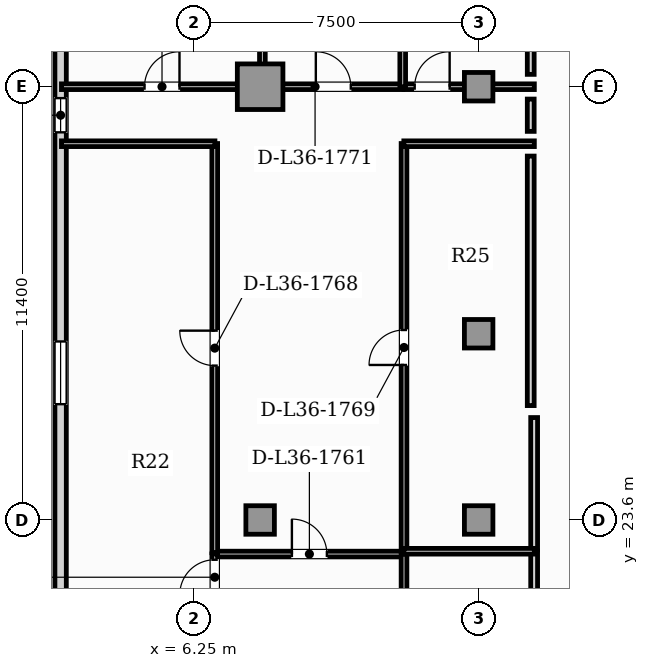
"""IFC4 building model, lengths in metres.
Left out: names, types, materials, properties, quantities, classifications, styles, units other than length and angle.
Written with IfcOpenShell. Run it as: python <this file> out.ifc"""

import sys

from ifc_helpers import new_model, si_unit, direction, frame, frame_2d, origin, origin_2d, place, context, subcontext, project, spatial, rectangle, hollow_rectangle, extrude, element, fill, save


model = new_model("IFC4")
c1 = context("Model", 3, precision=1e-05, world=origin(), true_north=direction((0.0, 1.0)))
c2 = subcontext(c1, "Body", "Model", "MODEL_VIEW")
j1 = project(units=[si_unit("LENGTHUNIT", "METRE"), si_unit("PLANEANGLEUNIT", "RADIAN")], contexts=[c1])
p1 = place(None, origin())
s1 = spatial("IfcSite", under=j1, at=p1, CompositionType="ELEMENT")
p2 = place(p1, origin())
s2 = spatial("IfcBuilding", under=s1, at=p2, CompositionType="ELEMENT")
p3 = place(p2, frame((0.0, 0.0, 149.05)))
s3 = spatial("IfcBuildingStorey", under=s2, at=p3, CompositionType="ELEMENT", Elevation=149.05)
p4 = place(p3, frame((8.0, 35.0, 0.0), z_axis=(0.0, 0.0, 1.0), x_axis=(1.0, 0.0, 0.0)))
e1 = element("IfcColumn", 1, at=p4, inside=s3, PredefinedType="USERDEFINED", context=c2, shape_type="SweptSolid", body=[
    extrude(hollow_rectangle(XDim=1.2, YDim=1.2, WallThickness=0.07, at=origin_2d()), origin(), (0.0, 0.0, 1.0), 3.85),
])
for number, where, z_axis, x_axis in (
    (2, (8.0, 23.6, 0.0), (0.0, 0.0, 1.0), (1.0, 0.0, 0.0)),
    (3, (13.75, 23.6, 0.0), (0.0, 0.0, 1.0), (1.0, 0.0, 0.0)),
    (4, (13.75, 28.5, 0.0), (0.0, 0.0, 1.0), (1.0, 0.0, 0.0)),
    (5, (13.75, 35.0, 0.0), (0.0, 0.0, 1.0), (1.0, 0.0, 0.0)),
):
    element("IfcColumn", number, at=place(p3, frame(where, z_axis=z_axis, x_axis=x_axis)), inside=s3, PredefinedType="COLUMN", context=c2, shape_type="SweptSolid", body=[
        extrude(rectangle(XDim=0.75, YDim=0.75, at=origin_2d()), origin(), (0.0, 0.0, 1.0), 3.85),
    ])
p5 = place(p3, frame((2.75, 39.96, 0.0), z_axis=(0.0, 0.0, 1.0), x_axis=(0.0, -1.0, 0.0)))
e6 = element("IfcWall", 6, at=p5, inside=s3, PredefinedType="SOLIDWALL", context=c2, shape_type="SweptSolid", body=[
    extrude(rectangle(XDim=36.72, YDim=0.3, at=frame_2d((18.36, 0.0))), origin(), (0.0, 0.0, 1.0), 3.63),
])
p6 = place(p5, frame((5.26, 0.0, 0.95)))
e7 = element("IfcOpeningElement", 7, at=p6, cuts=e6, PredefinedType="OPENING", context=c2, shape_type="SweptSolid", body=[
    extrude(rectangle(XDim=0.9, YDim=1.5, at=frame_2d((0.45, 0.75))), frame((0.0, 0.16, 0.0), z_axis=(0.0, -1.0, 0.0), x_axis=(1.0, 0.0, 0.0)), (0.0, 0.0, 1.0), 0.32),
])
p7 = place(p5, frame((19.283, 0.0, 0.88)))
e8 = element("IfcOpeningElement", 8, at=p7, cuts=e6, PredefinedType="OPENING", context=c2, shape_type="SweptSolid", body=[
    extrude(rectangle(XDim=1.65, YDim=2.0, at=frame_2d((0.825, 1.0))), frame((0.0, 0.16, 0.0), z_axis=(0.0, -1.0, 0.0), x_axis=(1.0, 0.0, 0.0)), (0.0, 0.0, 1.0), 0.32),
])
p8 = place(p5, frame((11.663, 0.0, 0.88)))
e9 = element("IfcOpeningElement", 9, at=p8, cuts=e6, PredefinedType="OPENING", context=c2, shape_type="SweptSolid", body=[
    extrude(rectangle(XDim=1.65, YDim=2.0, at=frame_2d((0.825, 1.0))), frame((0.0, 0.16, 0.0), z_axis=(0.0, -1.0, 0.0), x_axis=(1.0, 0.0, 0.0)), (0.0, 0.0, 1.0), 0.32),
])
p9 = place(p3, frame((15.21, 16.944, 0.0), z_axis=(0.0, 0.0, 1.0), x_axis=(0.0, 1.0, 0.0)))
e10 = element("IfcWall", 10, at=p9, inside=s3, PredefinedType="PARTITIONING", context=c2, shape_type="SweptSolid", body=[
    extrude(rectangle(XDim=5.838, YDim=0.18, at=frame_2d((2.919, 0.0))), origin(), (0.0, 0.0, 1.0), 3.63),
])
p10 = place(p3, frame((15.21, 22.812, 0.0), z_axis=(0.0, 0.0, 1.0), x_axis=(0.0, 1.0, 0.0)))
e11 = element("IfcWall", 11, at=p10, inside=s3, PredefinedType="PARTITIONING", context=c2, shape_type="SweptSolid", body=[
    extrude(rectangle(XDim=3.482, YDim=0.18, at=frame_2d((1.741, 0.0))), origin(), (0.0, 0.0, 1.0), 3.63),
])
p11 = place(p3, frame((6.801, 22.703, 0.0), z_axis=(0.0, 0.0, 1.0), x_axis=(1.0, 0.0, 0.0)))
e12 = element("IfcWall", 12, at=p11, inside=s3, PredefinedType="PARTITIONING", context=c2, shape_type="SweptSolid", body=[
    extrude(rectangle(XDim=4.99, YDim=0.15, at=frame_2d((2.495, 0.0))), origin(), (0.0, 0.0, 1.0), 3.63),
])
p12 = place(p11, frame((2.035, 0.0, 0.0)))
e13 = element("IfcOpeningElement", 13, at=p12, cuts=e12, PredefinedType="OPENING", context=c2, shape_type="SweptSolid", body=[
    extrude(rectangle(XDim=0.92, YDim=2.1, at=frame_2d((0.46, 1.05))), frame((0.0, 0.085, 0.0), z_axis=(0.0, -1.0, 0.0), x_axis=(1.0, 0.0, 0.0)), (0.0, 0.0, 1.0), 0.17),
])
p13 = place(p3, frame((6.806, 21.479, 0.0), z_axis=(0.0, 0.0, 1.0), x_axis=(0.0, 1.0, 0.0)))
e14 = element("IfcWall", 14, at=p13, inside=s3, PredefinedType="PARTITIONING", context=c2, shape_type="SweptSolid", body=[
    extrude(rectangle(XDim=1.229, YDim=0.15, at=frame_2d((0.615, 0.0))), origin(), (0.0, 0.0, 1.0), 3.63),
])
p14 = place(p13, frame((0.155, 0.0, 0.0)))
e15 = element("IfcOpeningElement", 15, at=p14, cuts=e14, PredefinedType="OPENING", context=c2, shape_type="SweptSolid", body=[
    extrude(rectangle(XDim=0.92, YDim=2.1, at=frame_2d((0.46, 1.05))), frame((0.0, 0.085, 0.0), z_axis=(0.0, -1.0, 0.0), x_axis=(1.0, 0.0, 0.0)), (0.0, 0.0, 1.0), 0.17),
])
p15 = place(p3, frame((11.786, 16.944, 0.0), z_axis=(0.0, 0.0, 1.0), x_axis=(0.0, 1.0, 0.0)))
e16 = element("IfcWall", 16, at=p15, inside=s3, PredefinedType="PARTITIONING", context=c2, shape_type="SweptSolid", body=[
    extrude(rectangle(XDim=5.764, YDim=0.15, at=frame_2d((2.882, 0.0))), origin(), (0.0, 0.0, 1.0), 3.63),
])
p16 = place(p15, frame((2.422, 0.0, 0.0)))
e17 = element("IfcOpeningElement", 17, at=p16, cuts=e16, PredefinedType="OPENING", context=c2, shape_type="SweptSolid", body=[
    extrude(rectangle(XDim=0.92, YDim=2.1, at=frame_2d((0.46, 1.05))), frame((0.0, 0.085, 0.0), z_axis=(0.0, -1.0, 0.0), x_axis=(1.0, 0.0, 0.0)), (0.0, 0.0, 1.0), 0.17),
])
p17 = place(p3, frame((6.806, 22.738, 0.0), z_axis=(0.0, 0.0, 1.0), x_axis=(0.0, 1.0, 0.0)))
e18 = element("IfcWall", 18, at=p17, inside=s3, PredefinedType="PARTITIONING", context=c2, shape_type="SweptSolid", body=[
    extrude(rectangle(XDim=10.767, YDim=0.15, at=frame_2d((5.383, 0.0))), origin(), (0.0, 0.0, 1.0), 3.63),
])
p18 = place(p17, frame((4.923, 0.0, 0.0)))
e19 = element("IfcOpeningElement", 19, at=p18, cuts=e18, PredefinedType="OPENING", context=c2, shape_type="SweptSolid", body=[
    extrude(rectangle(XDim=0.92, YDim=2.1, at=frame_2d((0.46, 1.05))), frame((0.0, 0.085, 0.0), z_axis=(0.0, -1.0, 0.0), x_axis=(1.0, 0.0, 0.0)), (0.0, 0.0, 1.0), 0.17),
])
p19 = place(p3, frame((2.772, 33.5, 0.0), z_axis=(0.0, 0.0, 1.0), x_axis=(1.0, 0.0, 0.0)))
e20 = element("IfcWall", 20, at=p19, inside=s3, PredefinedType="PARTITIONING", context=c2, shape_type="SweptSolid", body=[
    extrude(rectangle(XDim=4.038, YDim=0.15, at=frame_2d((2.019, 0.0))), origin(), (0.0, 0.0, 1.0), 3.63),
])
p20 = place(p3, frame((11.786, 22.772, 0.0), z_axis=(0.0, 0.0, 1.0), x_axis=(0.0, 1.0, 0.0)))
e21 = element("IfcWall", 21, at=p20, inside=s3, PredefinedType="PARTITIONING", context=c2, shape_type="SweptSolid", body=[
    extrude(rectangle(XDim=10.732, YDim=0.15, at=frame_2d((5.366, 0.0))), origin(), (0.0, 0.0, 1.0), 3.63),
])
p21 = place(p20, frame((4.906, 0.0, 0.0)))
e22 = element("IfcOpeningElement", 22, at=p21, cuts=e21, PredefinedType="OPENING", context=c2, shape_type="SweptSolid", body=[
    extrude(rectangle(XDim=0.92, YDim=2.1, at=frame_2d((0.46, 1.05))), frame((0.0, 0.085, 0.0), z_axis=(0.0, -1.0, 0.0), x_axis=(1.0, 0.0, 0.0)), (0.0, 0.0, 1.0), 0.17),
])
p22 = place(p3, frame((11.781, 33.5, 0.0), z_axis=(0.0, 0.0, 1.0), x_axis=(1.0, 0.0, 0.0)))
e23 = element("IfcWall", 23, at=p22, inside=s3, PredefinedType="PARTITIONING", context=c2, shape_type="SweptSolid", body=[
    extrude(rectangle(XDim=3.434, YDim=0.15, at=frame_2d((1.717, 0.0))), origin(), (0.0, 0.0, 1.0), 3.63),
])
p23 = place(p3, frame((2.772, 35.0, 0.0), z_axis=(0.0, 0.0, 1.0), x_axis=(1.0, 0.0, 0.0)))
e24 = element("IfcWall", 24, at=p23, inside=s3, PredefinedType="PARTITIONING", context=c2, shape_type="SweptSolid", body=[
    extrude(rectangle(XDim=5.292, YDim=0.15, at=frame_2d((2.646, 0.0))), origin(), (0.0, 0.0, 1.0), 3.63),
])
p24 = place(p23, frame((2.186, 0.0, 0.0)))
e25 = element("IfcOpeningElement", 25, at=p24, cuts=e24, PredefinedType="OPENING", context=c2, shape_type="SweptSolid", body=[
    extrude(rectangle(XDim=0.92, YDim=2.1, at=frame_2d((0.46, 1.05))), frame((0.0, 0.085, 0.0), z_axis=(0.0, -1.0, 0.0), x_axis=(1.0, 0.0, 0.0)), (0.0, 0.0, 1.0), 0.17),
])
p25 = place(p3, frame((8.094, 35.0, 0.0), z_axis=(0.0, 0.0, 1.0), x_axis=(1.0, 0.0, 0.0)))
e26 = element("IfcWall", 26, at=p25, inside=s3, PredefinedType="PARTITIONING", context=c2, shape_type="SweptSolid", body=[
    extrude(rectangle(XDim=3.662, YDim=0.15, at=frame_2d((1.831, 0.0))), origin(), (0.0, 0.0, 1.0), 3.013),
])
p26 = place(p25, frame((1.371, 0.0, 0.0)))
e27 = element("IfcOpeningElement", 27, at=p26, cuts=e26, PredefinedType="OPENING", context=c2, shape_type="SweptSolid", body=[
    extrude(rectangle(XDim=0.92, YDim=2.1, at=frame_2d((0.46, 1.05))), frame((0.0, 0.085, 0.0), z_axis=(0.0, -1.0, 0.0), x_axis=(1.0, 0.0, 0.0)), (0.0, 0.0, 1.0), 0.17),
])
p27 = place(p3, frame((11.787, 35.0, 0.0), z_axis=(0.0, 0.0, 1.0), x_axis=(1.0, 0.0, 0.0)))
e28 = element("IfcWall", 28, at=p27, inside=s3, PredefinedType="PARTITIONING", context=c2, shape_type="SweptSolid", body=[
    extrude(rectangle(XDim=3.428, YDim=0.15, at=frame_2d((1.714, 0.0))), origin(), (0.0, 0.0, 1.0), 3.013),
])
p28 = place(p27, frame((0.28, 0.0, 0.0)))
e29 = element("IfcOpeningElement", 29, at=p28, cuts=e28, PredefinedType="OPENING", context=c2, shape_type="SweptSolid", body=[
    extrude(rectangle(XDim=0.92, YDim=2.1, at=frame_2d((0.46, 1.05))), frame((0.0, 0.085, 0.0), z_axis=(0.0, -1.0, 0.0), x_axis=(1.0, 0.0, 0.0)), (0.0, 0.0, 1.0), 0.17),
])
p29 = place(p3, frame((11.781, 22.777, 0.0), z_axis=(0.0, 0.0, 1.0), x_axis=(1.0, 0.0, 0.0)))
e30 = element("IfcWall", 30, at=p29, inside=s3, PredefinedType="PARTITIONING", context=c2, shape_type="SweptSolid", body=[
    extrude(rectangle(XDim=3.434, YDim=0.15, at=frame_2d((1.717, 0.0))), origin(), (0.0, 0.0, 1.0), 3.63),
])
for number, where, z_axis, x_axis in (
    (31, (8.059, 34.995, 0.0), (0.0, 0.0, 1.0), (0.0, 1.0, 0.0)),
    (32, (11.752, 34.995, 0.0), (0.0, 0.0, 1.0), (0.0, 1.0, 0.0)),
):
    element("IfcWall", number, at=place(p3, frame(where, z_axis=z_axis, x_axis=x_axis)), inside=s3, PredefinedType="PARTITIONING", context=c2, shape_type="SweptSolid", body=[
        extrude(rectangle(XDim=8.032, YDim=0.15, at=frame_2d((4.016, 0.0))), origin(), (0.0, 0.0, 1.0), 3.63),
    ])
p30 = place(p3, frame((15.12, 34.675, 0.0), z_axis=(0.0, 0.0, 1.0), x_axis=(0.0, -1.0, 0.0)))
e33 = element("IfcWall", 33, at=p30, inside=s3, PredefinedType="PARTITIONING", context=c2, shape_type="SweptSolid", body=[
    extrude(rectangle(XDim=0.85, YDim=0.18, at=frame_2d((0.425, 0.0))), origin(), (0.0, 0.0, 1.0), 3.63),
])
p31 = place(p3, frame((15.12, 33.175, 0.0), z_axis=(0.0, 0.0, 1.0), x_axis=(0.0, -1.0, 0.0)))
e34 = element("IfcWall", 34, at=p31, inside=s3, PredefinedType="PARTITIONING", context=c2, shape_type="SweptSolid", body=[
    extrude(rectangle(XDim=6.565, YDim=0.18, at=frame_2d((3.283, 0.0))), origin(), (0.0, 0.0, 1.0), 3.63),
])
p32 = place(p3, frame((15.12, 43.028, 0.0), z_axis=(0.0, 0.0, 1.0), x_axis=(0.0, -1.0, 0.0)))
e35 = element("IfcWall", 35, at=p32, inside=s3, PredefinedType="PARTITIONING", context=c2, shape_type="SweptSolid", body=[
    extrude(rectangle(XDim=7.703, YDim=0.18, at=frame_2d((3.851, 0.0))), origin(), (0.0, 0.0, 1.0), 3.63),
])
p33 = place(p6, origin())
e36 = element("IfcWindow", 36, at=p33, inside=s3, PartitioningType="SINGLE_PANEL", PredefinedType="WINDOW", context=c2, shape_type="SweptSolid", body=[
    extrude(rectangle(XDim=0.9, YDim=1.5, at=frame_2d((0.45, 0.75))), frame((0.0, 0.03, 0.0), z_axis=(0.0, -1.0, 0.0), x_axis=(1.0, 0.0, 0.0)), (0.0, 0.0, 1.0), 0.06),
])
fill(e7, e36)
p34 = place(p8, origin())
e37 = element("IfcWindow", 37, at=p34, inside=s3, PartitioningType="SINGLE_PANEL", PredefinedType="WINDOW", context=c2, shape_type="SweptSolid", body=[
    extrude(rectangle(XDim=1.65, YDim=2.0, at=frame_2d((0.825, 1.0))), frame((0.0, 0.03, 0.0), z_axis=(0.0, -1.0, 0.0), x_axis=(1.0, 0.0, 0.0)), (0.0, 0.0, 1.0), 0.06),
])
fill(e9, e37)
p35 = place(p12, origin())
e38 = element("IfcDoor", 38, at=p35, inside=s3, OperationType="SINGLE_SWING_LEFT", PredefinedType="DOOR", context=c2, shape_type="SweptSolid", body=[
    extrude(rectangle(XDim=0.92, YDim=2.1, at=frame_2d((0.46, 1.05))), frame((0.0, 0.025, 0.0), z_axis=(0.0, -1.0, 0.0), x_axis=(1.0, 0.0, 0.0)), (0.0, 0.0, 1.0), 0.05),
])
fill(e13, e38)
p36 = place(p14, origin())
e39 = element("IfcDoor", 39, at=p36, inside=s3, OperationType="SINGLE_SWING_LEFT", PredefinedType="DOOR", context=c2, shape_type="SweptSolid", body=[
    extrude(rectangle(XDim=0.92, YDim=2.1, at=frame_2d((0.46, 1.05))), frame((0.0, 0.025, 0.0), z_axis=(0.0, -1.0, 0.0), x_axis=(1.0, 0.0, 0.0)), (0.0, 0.0, 1.0), 0.05),
])
fill(e15, e39)
p37 = place(p18, origin())
e40 = element("IfcDoor", 40, at=p37, inside=s3, OperationType="SINGLE_SWING_RIGHT", PredefinedType="DOOR", context=c2, shape_type="SweptSolid", body=[
    extrude(rectangle(XDim=0.92, YDim=2.1, at=frame_2d((0.46, 1.05))), frame((0.0, 0.025, 0.0), z_axis=(0.0, -1.0, 0.0), x_axis=(1.0, 0.0, 0.0)), (0.0, 0.0, 1.0), 0.05),
])
fill(e19, e40)
p38 = place(p21, origin())
e41 = element("IfcDoor", 41, at=p38, inside=s3, OperationType="SINGLE_SWING_LEFT", PredefinedType="DOOR", context=c2, shape_type="SweptSolid", body=[
    extrude(rectangle(XDim=0.92, YDim=2.1, at=frame_2d((0.46, 1.05))), frame((0.0, 0.025, 0.0), z_axis=(0.0, -1.0, 0.0), x_axis=(1.0, 0.0, 0.0)), (0.0, 0.0, 1.0), 0.05),
])
fill(e22, e41)
p39 = place(p24, origin())
e42 = element("IfcDoor", 42, at=p39, inside=s3, OperationType="SINGLE_SWING_RIGHT", PredefinedType="DOOR", context=c2, shape_type="SweptSolid", body=[
    extrude(rectangle(XDim=0.92, YDim=2.1, at=frame_2d((0.46, 1.05))), frame((0.0, 0.025, 0.0), z_axis=(0.0, -1.0, 0.0), x_axis=(1.0, 0.0, 0.0)), (0.0, 0.0, 1.0), 0.05),
])
fill(e25, e42)
p40 = place(p26, origin())
e43 = element("IfcDoor", 43, at=p40, inside=s3, OperationType="SINGLE_SWING_LEFT", PredefinedType="DOOR", context=c2, shape_type="SweptSolid", body=[
    extrude(rectangle(XDim=0.92, YDim=2.1, at=frame_2d((0.46, 1.05))), frame((0.0, 0.025, 0.0), z_axis=(0.0, -1.0, 0.0), x_axis=(1.0, 0.0, 0.0)), (0.0, 0.0, 1.0), 0.05),
])
fill(e27, e43)
p41 = place(p28, origin())
e44 = element("IfcDoor", 44, at=p41, inside=s3, OperationType="SINGLE_SWING_RIGHT", PredefinedType="DOOR", context=c2, shape_type="SweptSolid", body=[
    extrude(rectangle(XDim=0.92, YDim=2.1, at=frame_2d((0.46, 1.05))), frame((0.0, 0.025, 0.0), z_axis=(0.0, -1.0, 0.0), x_axis=(1.0, 0.0, 0.0)), (0.0, 0.0, 1.0), 0.05),
])
fill(e29, e44)
save(model, sys.argv[1])
